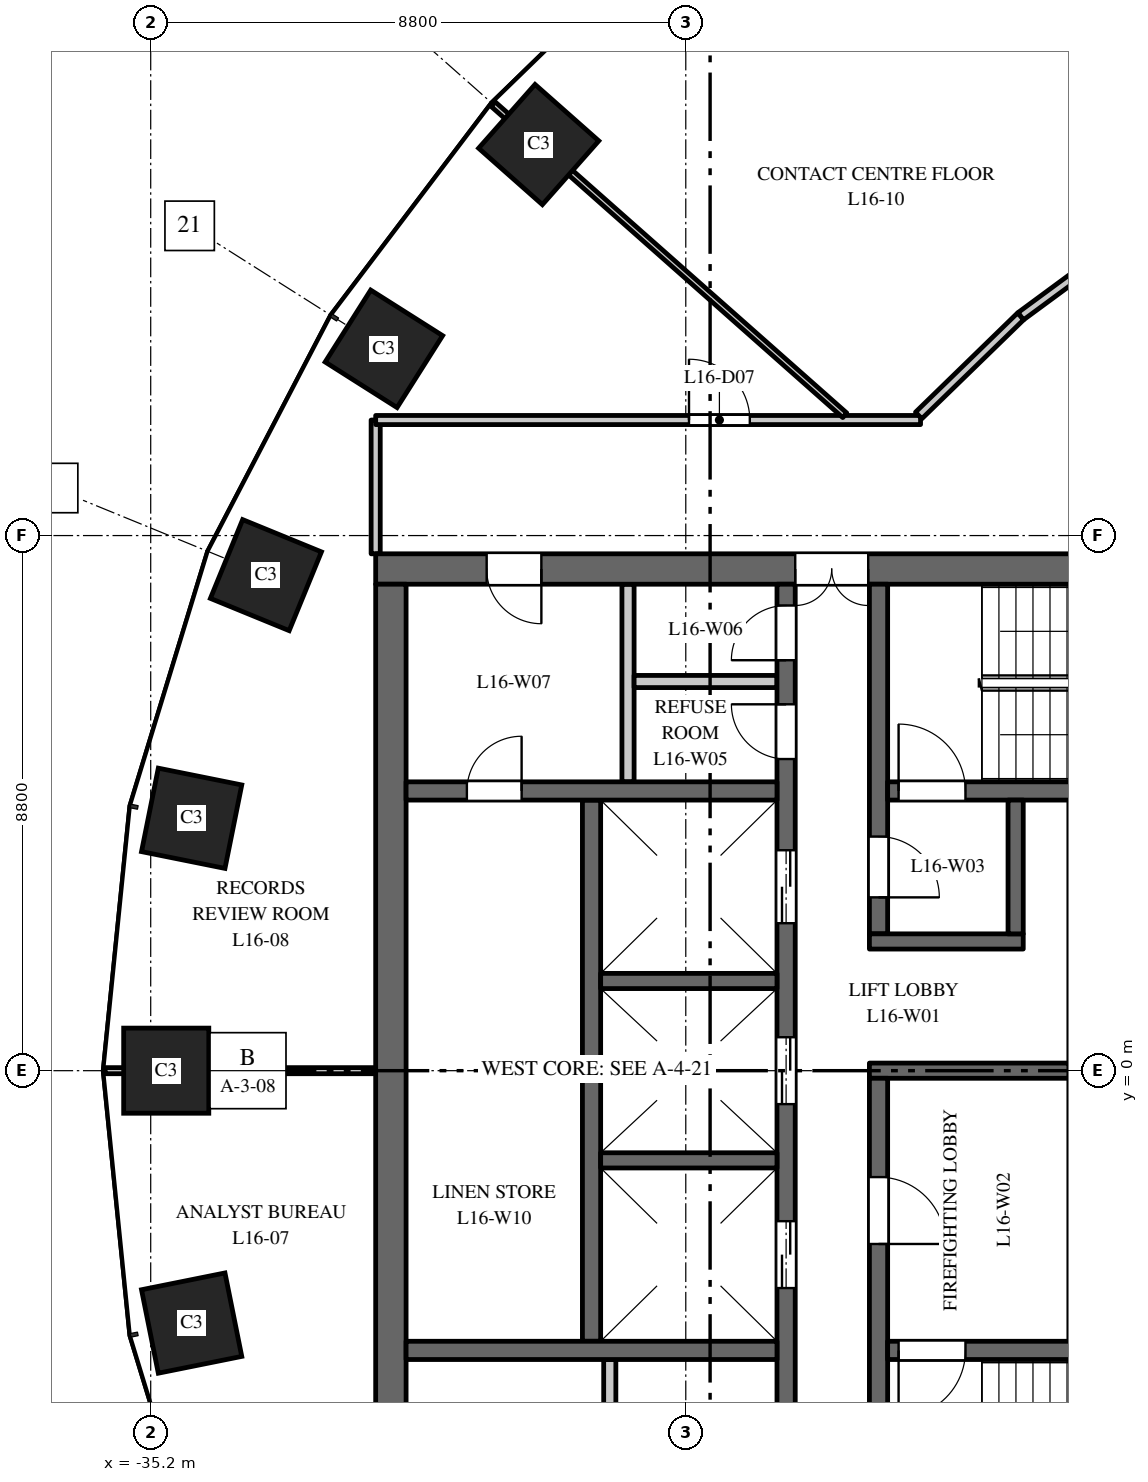
"""IFC4 building model, lengths in metres.
Left out: names, types, materials, properties, quantities, classifications, styles, units other than length and angle.
Written with IfcOpenShell. Run it as: python <this file> out.ifc"""

import sys

from ifc_helpers import new_model, si_unit, direction, frame, frame_2d, origin, origin_2d, place, context, subcontext, project, spatial, rectangle, extrude, element, fill, save


model = new_model("IFC4")
c1 = context("Model", 3, precision=1e-05, world=origin(), true_north=direction((0.0, 1.0)))
c2 = subcontext(c1, "Body", "Model", "MODEL_VIEW")
j1 = project(units=[si_unit("LENGTHUNIT", "METRE"), si_unit("PLANEANGLEUNIT", "RADIAN")], contexts=[c1])
p1 = place(None, origin())
s1 = spatial("IfcSite", under=j1, at=p1, CompositionType="ELEMENT")
p2 = place(p1, origin())
s2 = spatial("IfcBuilding", under=s1, at=p2, CompositionType="ELEMENT")
p3 = place(p2, frame((0.0, 0.0, 74.5)))
s3 = spatial("IfcBuildingStorey", under=s2, at=p3, CompositionType="ELEMENT", Elevation=74.5)
for number, where, z_axis, x_axis in (
    (1, (-28.819, 15.23, 0.0), (0.0, 0.0, 1.0), (-0.663, -0.749, 0.0)),
    (2, (-31.365, 11.871, 0.0), (0.0, 0.0, 1.0), (-0.535, -0.845, 0.0)),
    (3, (-33.305, 8.149, 0.0), (0.0, 0.0, 1.0), (-0.379, -0.925, 0.0)),
    (4, (-34.527, 4.151, 0.0), (0.0, 0.0, 1.0), (-0.197, -0.98, 0.0)),
    (5, (-34.945, 0.0, 0.0), (0.0, 0.0, 1.0), (0.0, -1.0, 0.0)),
    (6, (-34.527, -4.151, 0.0), (0.0, 0.0, 1.0), (0.197, -0.98, 0.0)),
):
    element("IfcColumn", number, at=place(p3, frame(where, z_axis=z_axis, x_axis=x_axis)), inside=s3, PredefinedType="COLUMN", context=c2, shape_type="SweptSolid", body=[
        extrude(rectangle(XDim=1.4, YDim=1.4, at=origin_2d()), origin(), (0.0, 0.0, 1.0), 4.0),
    ])
p4 = place(p3, frame((-16.5, 8.25, 0.0), z_axis=(0.0, 0.0, 1.0), x_axis=(-1.0, 0.0, 0.0)))
e7 = element("IfcWall", 7, at=p4, inside=s3, PredefinedType="SHEAR", context=c2, shape_type="SweptSolid", body=[
    extrude(rectangle(XDim=15.0, YDim=0.5, at=frame_2d((7.5, 0.0))), origin(), (0.0, 0.0, 1.0), 3.7),
])
p5 = place(p4, frame((6.9, 0.0, 0.0)))
e8 = element("IfcOpeningElement", 8, at=p5, cuts=e7, PredefinedType="OPENING", context=c2, shape_type="SweptSolid", body=[
    extrude(rectangle(XDim=1.2, YDim=2.1, at=frame_2d((0.6, 1.05))), frame((0.0, 0.26, 0.0), z_axis=(0.0, -1.0, 0.0), x_axis=(1.0, 0.0, 0.0)), (0.0, 0.0, 1.0), 0.52),
])
p6 = place(p4, frame((12.275, 0.0, 0.0)))
e9 = element("IfcOpeningElement", 9, at=p6, cuts=e7, PredefinedType="OPENING", context=c2, shape_type="SweptSolid", body=[
    extrude(rectangle(XDim=0.9, YDim=2.1, at=frame_2d((0.45, 1.05))), frame((0.0, 0.26, 0.0), z_axis=(0.0, -1.0, 0.0), x_axis=(1.0, 0.0, 0.0)), (0.0, 0.0, 1.0), 0.52),
])
p7 = place(p3, frame((-27.95, -4.45, 0.0), z_axis=(0.0, 0.0, 1.0), x_axis=(0.0, 1.0, 0.0)))
e10 = element("IfcWall", 10, at=p7, inside=s3, PredefinedType="SHEAR", context=c2, shape_type="SweptSolid", body=[
    extrude(rectangle(XDim=8.9, YDim=0.3, at=frame_2d((4.45, 0.0))), origin(), (0.0, 0.0, 1.0), 3.7),
])
p8 = place(p3, frame((-24.75, -8.0, 0.0), z_axis=(0.0, 0.0, 1.0), x_axis=(0.0, 1.0, 0.0)))
e11 = element("IfcWall", 11, at=p8, inside=s3, PredefinedType="SHEAR", context=c2, shape_type="SweptSolid", body=[
    extrude(rectangle(XDim=16.0, YDim=0.3, at=frame_2d((8.0, 0.0))), origin(), (0.0, 0.0, 1.0), 3.7),
])
p9 = place(p8, frame((4.425, 0.0, 0.0)))
e12 = element("IfcOpeningElement", 12, at=p9, cuts=e11, PredefinedType="OPENING", context=c2, shape_type="SweptSolid", body=[
    extrude(rectangle(XDim=1.1, YDim=2.1, at=frame_2d((0.55, 1.05))), frame((0.0, 0.16, 0.0), z_axis=(0.0, -1.0, 0.0), x_axis=(1.0, 0.0, 0.0)), (0.0, 0.0, 1.0), 0.32),
])
p10 = place(p8, frame((7.45, 0.0, 0.0)))
e13 = element("IfcOpeningElement", 13, at=p10, cuts=e11, PredefinedType="OPENING", context=c2, shape_type="SweptSolid", body=[
    extrude(rectangle(XDim=1.1, YDim=2.1, at=frame_2d((0.55, 1.05))), frame((0.0, 0.16, 0.0), z_axis=(0.0, -1.0, 0.0), x_axis=(1.0, 0.0, 0.0)), (0.0, 0.0, 1.0), 0.32),
])
p11 = place(p8, frame((10.425, 0.0, 0.0)))
e14 = element("IfcOpeningElement", 14, at=p11, cuts=e11, PredefinedType="OPENING", context=c2, shape_type="SweptSolid", body=[
    extrude(rectangle(XDim=1.2, YDim=2.1, at=frame_2d((0.6, 1.05))), frame((0.0, 0.16, 0.0), z_axis=(0.0, -1.0, 0.0), x_axis=(1.0, 0.0, 0.0)), (0.0, 0.0, 1.0), 0.32),
])
p12 = place(p8, frame((13.125, 0.0, 0.0)))
e15 = element("IfcOpeningElement", 15, at=p12, cuts=e11, PredefinedType="OPENING", context=c2, shape_type="SweptSolid", body=[
    extrude(rectangle(XDim=0.9, YDim=2.1, at=frame_2d((0.45, 1.05))), frame((0.0, 0.16, 0.0), z_axis=(0.0, -1.0, 0.0), x_axis=(1.0, 0.0, 0.0)), (0.0, 0.0, 1.0), 0.32),
])
p13 = place(p8, frame((14.75, 0.0, 0.0)))
e16 = element("IfcOpeningElement", 16, at=p13, cuts=e11, PredefinedType="OPENING", context=c2, shape_type="SweptSolid", body=[
    extrude(rectangle(XDim=0.9, YDim=2.1, at=frame_2d((0.45, 1.05))), frame((0.0, 0.16, 0.0), z_axis=(0.0, -1.0, 0.0), x_axis=(1.0, 0.0, 0.0)), (0.0, 0.0, 1.0), 0.32),
])
p14 = place(p8, frame((1.35, 0.0, 0.0)))
e17 = element("IfcOpeningElement", 17, at=p14, cuts=e11, PredefinedType="OPENING", context=c2, shape_type="SweptSolid", body=[
    extrude(rectangle(XDim=0.9, YDim=2.1, at=frame_2d((0.45, 1.05))), frame((0.0, 0.16, 0.0), z_axis=(0.0, -1.0, 0.0), x_axis=(1.0, 0.0, 0.0)), (0.0, 0.0, 1.0), 0.32),
])
p15 = place(p3, frame((-20.1, 0.0, 0.0), z_axis=(0.0, 0.0, 1.0), x_axis=(-1.0, 0.0, 0.0)))
e18 = element("IfcWall", 18, at=p15, inside=s3, PredefinedType="SHEAR", context=c2, shape_type="SweptSolid", body=[
    extrude(rectangle(XDim=3.28, YDim=0.25, at=frame_2d((1.64, 0.0))), origin(), (0.0, 0.0, 1.0), 3.7),
])
p16 = place(p3, frame((-31.25, -8.0, 0.0), z_axis=(0.0, 0.0, 1.0), x_axis=(0.0, 1.0, 0.0)))
e19 = element("IfcWall", 19, at=p16, inside=s3, PredefinedType="SHEAR", context=c2, shape_type="SweptSolid", body=[
    extrude(rectangle(XDim=16.0, YDim=0.5, at=frame_2d((8.0, 0.0))), origin(), (0.0, 0.0, 1.0), 3.7),
])
p17 = place(p3, frame((-24.9, 4.6, 0.0), z_axis=(0.0, 0.0, 1.0), x_axis=(-1.0, 0.0, 0.0)))
e20 = element("IfcWall", 20, at=p17, inside=s3, PredefinedType="SHEAR", context=c2, shape_type="SweptSolid", body=[
    extrude(rectangle(XDim=6.1, YDim=0.3, at=frame_2d((3.05, 0.0))), origin(), (0.0, 0.0, 1.0), 3.7),
])
p18 = place(p17, frame((4.2, 0.0, 0.0)))
e21 = element("IfcOpeningElement", 21, at=p18, cuts=e20, PredefinedType="OPENING", context=c2, shape_type="SweptSolid", body=[
    extrude(rectangle(XDim=0.9, YDim=2.1, at=frame_2d((0.45, 1.05))), frame((0.0, 0.16, 0.0), z_axis=(0.0, -1.0, 0.0), x_axis=(1.0, 0.0, 0.0)), (0.0, 0.0, 1.0), 0.32),
])
for number, where, z_axis, x_axis in (
    (22, (-27.35, 4.75, 0.0), (0.0, 0.0, 1.0), (0.0, 1.0, 0.0)),
    (23, (-27.65, -8.0, 0.0), (0.0, 0.0, 1.0), (0.0, 1.0, 0.0)),
):
    element("IfcWall", number, at=place(p3, frame(where, z_axis=z_axis, x_axis=x_axis)), inside=s3, PredefinedType="PARTITIONING", context=c2, shape_type="SweptSolid", body=[
        extrude(rectangle(XDim=3.25, YDim=0.2, at=frame_2d((1.625, 0.0))), origin(), (0.0, 0.0, 1.0), 3.7),
    ])
p19 = place(p3, frame((-24.9, 6.4, 0.0), z_axis=(0.0, 0.0, 1.0), x_axis=(-1.0, 0.0, 0.0)))
e24 = element("IfcWall", 24, at=p19, inside=s3, PredefinedType="PARTITIONING", context=c2, shape_type="SweptSolid", body=[
    extrude(rectangle(XDim=2.35, YDim=0.2, at=frame_2d((1.175, 0.0))), origin(), (0.0, 0.0, 1.0), 3.7),
])
p20 = place(p3, frame((-24.9, -4.6, 0.0), z_axis=(0.0, 0.0, 1.0), x_axis=(-1.0, 0.0, 0.0)))
e25 = element("IfcWall", 25, at=p20, inside=s3, PredefinedType="SHEAR", context=c2, shape_type="SweptSolid", body=[
    extrude(rectangle(XDim=6.1, YDim=0.3, at=frame_2d((3.05, 0.0))), origin(), (0.0, 0.0, 1.0), 3.7),
])
for number, where, z_axis, x_axis in (
    (26, (-24.9, -1.475, 0.0), (0.0, 0.0, 1.0), (-1.0, 0.0, 0.0)),
    (27, (-24.9, 1.475, 0.0), (0.0, 0.0, 1.0), (-1.0, 0.0, 0.0)),
):
    element("IfcWall", number, at=place(p3, frame(where, z_axis=z_axis, x_axis=x_axis)), inside=s3, PredefinedType="SHEAR", context=c2, shape_type="SweptSolid", body=[
        extrude(rectangle(XDim=2.9, YDim=0.25, at=frame_2d((1.45, 0.0))), origin(), (0.0, 0.0, 1.0), 3.7),
    ])
p21 = place(p3, frame((-23.23, 2.25, 0.0), z_axis=(0.0, 0.0, 1.0), x_axis=(0.0, 1.0, 0.0)))
e28 = element("IfcWall", 28, at=p21, inside=s3, PredefinedType="SHEAR", context=c2, shape_type="SweptSolid", body=[
    extrude(rectangle(XDim=5.75, YDim=0.3, at=frame_2d((2.875, 0.0))), origin(), (0.0, 0.0, 1.0), 3.7),
])
p22 = place(p21, frame((0.6, 0.0, 0.0)))
e29 = element("IfcOpeningElement", 29, at=p22, cuts=e28, PredefinedType="OPENING", context=c2, shape_type="SweptSolid", body=[
    extrude(rectangle(XDim=1.0, YDim=2.1, at=frame_2d((0.5, 1.05))), frame((0.0, 0.16, 0.0), z_axis=(0.0, -1.0, 0.0), x_axis=(1.0, 0.0, 0.0)), (0.0, 0.0, 1.0), 0.32),
])
p23 = place(p3, frame((-23.23, -8.0, 0.0), z_axis=(0.0, 0.0, 1.0), x_axis=(0.0, 1.0, 0.0)))
e30 = element("IfcWall", 30, at=p23, inside=s3, PredefinedType="SHEAR", context=c2, shape_type="SweptSolid", body=[
    extrude(rectangle(XDim=7.875, YDim=0.3, at=frame_2d((3.938, 0.0))), origin(), (0.0, 0.0, 1.0), 3.7),
])
p24 = place(p23, frame((5.15, 0.0, 0.0)))
e31 = element("IfcOpeningElement", 31, at=p24, cuts=e30, PredefinedType="OPENING", context=c2, shape_type="SweptSolid", body=[
    extrude(rectangle(XDim=1.1, YDim=2.1, at=frame_2d((0.55, 1.05))), frame((0.0, 0.16, 0.0), z_axis=(0.0, -1.0, 0.0), x_axis=(1.0, 0.0, 0.0)), (0.0, 0.0, 1.0), 0.32),
])
p25 = place(p3, frame((-16.9, 4.6, 0.0), z_axis=(0.0, 0.0, 1.0), x_axis=(-1.0, 0.0, 0.0)))
e32 = element("IfcWall", 32, at=p25, inside=s3, PredefinedType="SHEAR", context=c2, shape_type="SweptSolid", body=[
    extrude(rectangle(XDim=6.18, YDim=0.3, at=frame_2d((3.09, 0.0))), origin(), (0.0, 0.0, 1.0), 3.7),
])
p26 = place(p25, frame((4.9, 0.0, 0.0)))
e33 = element("IfcOpeningElement", 33, at=p26, cuts=e32, PredefinedType="OPENING", context=c2, shape_type="SweptSolid", body=[
    extrude(rectangle(XDim=1.1, YDim=2.1, at=frame_2d((0.55, 1.05))), frame((0.0, 0.16, 0.0), z_axis=(0.0, -1.0, 0.0), x_axis=(1.0, 0.0, 0.0)), (0.0, 0.0, 1.0), 0.32),
])
p27 = place(p3, frame((-16.9, -4.6, 0.0), z_axis=(0.0, 0.0, 1.0), x_axis=(-1.0, 0.0, 0.0)))
e34 = element("IfcWall", 34, at=p27, inside=s3, PredefinedType="SHEAR", context=c2, shape_type="SweptSolid", body=[
    extrude(rectangle(XDim=6.18, YDim=0.3, at=frame_2d((3.09, 0.0))), origin(), (0.0, 0.0, 1.0), 3.7),
])
p28 = place(p27, frame((4.9, 0.0, 0.0)))
e35 = element("IfcOpeningElement", 35, at=p28, cuts=e34, PredefinedType="OPENING", context=c2, shape_type="SweptSolid", body=[
    extrude(rectangle(XDim=1.1, YDim=2.1, at=frame_2d((0.55, 1.05))), frame((0.0, 0.16, 0.0), z_axis=(0.0, -1.0, 0.0), x_axis=(1.0, 0.0, 0.0)), (0.0, 0.0, 1.0), 0.32),
])
p29 = place(p3, frame((-20.85, 2.125, 0.0), z_axis=(0.0, 0.0, 1.0), x_axis=(-1.0, 0.0, 0.0)))
e36 = element("IfcWall", 36, at=p29, inside=s3, PredefinedType="SHEAR", context=c2, shape_type="SweptSolid", body=[
    extrude(rectangle(XDim=2.53, YDim=0.25, at=frame_2d((1.265, 0.0))), origin(), (0.0, 0.0, 1.0), 3.7),
])
p30 = place(p3, frame((-20.975, 2.25, 0.0), z_axis=(0.0, 0.0, 1.0), x_axis=(0.0, 1.0, 0.0)))
e37 = element("IfcWall", 37, at=p30, inside=s3, PredefinedType="SHEAR", context=c2, shape_type="SweptSolid", body=[
    extrude(rectangle(XDim=2.2, YDim=0.25, at=frame_2d((1.1, 0.0))), origin(), (0.0, 0.0, 1.0), 3.7),
])
p31 = place(p3, frame((-35.949, 0.0, 0.0), z_axis=(0.0, 0.0, 1.0), x_axis=(1.0, 0.0, 0.0)))
e38 = element("IfcWall", 38, at=p31, inside=s3, PredefinedType="PARTITIONING", context=c2, shape_type="SweptSolid", body=[
    extrude(rectangle(XDim=4.449, YDim=0.1, at=frame_2d((2.225, 0.0))), origin(), (0.0, 0.0, 1.0), 2.85),
])
p32 = place(p3, frame((-31.5, 8.5, 0.0), z_axis=(0.0, 0.0, 1.0), x_axis=(0.0, 1.0, 0.0)))
e39 = element("IfcWall", 39, at=p32, inside=s3, PredefinedType="PARTITIONING", context=c2, shape_type="SweptSolid", body=[
    extrude(rectangle(XDim=2.2, YDim=0.15, at=frame_2d((1.1, 0.0))), origin(), (0.0, 0.0, 1.0), 3.7),
])
p33 = place(p3, frame((-31.5, 10.7, 0.0), z_axis=(0.0, 0.0, 1.0), x_axis=(1.0, 0.0, 0.0)))
e40 = element("IfcWall", 40, at=p33, inside=s3, PredefinedType="PARTITIONING", context=c2, shape_type="SweptSolid", body=[
    extrude(rectangle(XDim=8.961, YDim=0.15, at=frame_2d((4.48, 0.0))), origin(), (0.0, 0.0, 1.0), 3.1),
])
p34 = place(p33, frame((5.153, 0.0, 0.0)))
e41 = element("IfcOpeningElement", 41, at=p34, cuts=e40, PredefinedType="OPENING", context=c2, shape_type="SweptSolid", body=[
    extrude(rectangle(XDim=1.0, YDim=2.1, at=frame_2d((0.5, 1.05))), frame((0.0, 0.085, 0.0), z_axis=(0.0, -1.0, 0.0), x_axis=(1.0, 0.0, 0.0)), (0.0, 0.0, 1.0), 0.17),
])
p35 = place(p3, frame((-29.569, 15.895, 0.0), z_axis=(0.0, 0.0, 1.0), x_axis=(0.748985701008, -0.662586160198, 0.0)))
e42 = element("IfcWall", 42, at=p35, inside=s3, PredefinedType="PARTITIONING", context=c2, shape_type="SweptSolid", body=[
    extrude(rectangle(XDim=7.723, YDim=0.1, at=frame_2d((3.861, 0.0))), origin(), (0.0, 0.0, 1.0), 2.85),
])
p36 = place(p3, frame((-22.57, 10.775, 0.0), z_axis=(0.0, 0.0, 1.0), x_axis=(0.717045582263, 0.697026278527, 0.0)))
e43 = element("IfcWall", 43, at=p36, inside=s3, PredefinedType="PARTITIONING", context=c2, shape_type="SweptSolid", body=[
    extrude(rectangle(XDim=2.342, YDim=0.15, at=frame_2d((1.171, 0.0))), origin(), (0.0, 0.0, 1.0), 3.7),
])
p37 = place(p3, frame((-20.891, 12.407, 0.0), z_axis=(0.0, 0.0, 1.0), x_axis=(0.805303685339, 0.592862525701, 0.0)))
e44 = element("IfcWall", 44, at=p37, inside=s3, PredefinedType="PARTITIONING", context=c2, shape_type="SweptSolid", body=[
    extrude(rectangle(XDim=3.267, YDim=0.15, at=frame_2d((1.634, 0.0))), origin(), (0.0, 0.0, 1.0), 2.75),
])
p38 = place(p9, origin())
e45 = element("IfcDoor", 45, at=p38, inside=s3, OperationType="DOUBLE_DOOR_SLIDING", PredefinedType="DOOR", context=c2, shape_type="SweptSolid", body=[
    extrude(rectangle(XDim=1.1, YDim=2.1, at=frame_2d((0.55, 1.05))), frame((0.0, 0.025, 0.0), z_axis=(0.0, -1.0, 0.0), x_axis=(1.0, 0.0, 0.0)), (0.0, 0.0, 1.0), 0.05),
])
fill(e12, e45)
p39 = place(p10, origin())
e46 = element("IfcDoor", 46, at=p39, inside=s3, OperationType="DOUBLE_DOOR_SLIDING", PredefinedType="DOOR", context=c2, shape_type="SweptSolid", body=[
    extrude(rectangle(XDim=1.1, YDim=2.1, at=frame_2d((0.55, 1.05))), frame((0.0, 0.025, 0.0), z_axis=(0.0, -1.0, 0.0), x_axis=(1.0, 0.0, 0.0)), (0.0, 0.0, 1.0), 0.05),
])
fill(e13, e46)
p40 = place(p11, origin())
e47 = element("IfcDoor", 47, at=p40, inside=s3, OperationType="DOUBLE_DOOR_SLIDING", PredefinedType="DOOR", context=c2, shape_type="SweptSolid", body=[
    extrude(rectangle(XDim=1.2, YDim=2.1, at=frame_2d((0.6, 1.05))), frame((0.0, 0.025, 0.0), z_axis=(0.0, -1.0, 0.0), x_axis=(1.0, 0.0, 0.0)), (0.0, 0.0, 1.0), 0.05),
])
fill(e14, e47)
p41 = place(p26, origin())
e48 = element("IfcDoor", 48, at=p41, inside=s3, OperationType="SINGLE_SWING_RIGHT", PredefinedType="DOOR", context=c2, shape_type="SweptSolid", body=[
    extrude(rectangle(XDim=1.1, YDim=2.1, at=frame_2d((0.55, 1.05))), frame((0.0, 0.025, 0.0), z_axis=(0.0, -1.0, 0.0), x_axis=(1.0, 0.0, 0.0)), (0.0, 0.0, 1.0), 0.05),
])
fill(e33, e48)
p42 = place(p28, origin())
e49 = element("IfcDoor", 49, at=p42, inside=s3, OperationType="SINGLE_SWING_LEFT", PredefinedType="DOOR", context=c2, shape_type="SweptSolid", body=[
    extrude(rectangle(XDim=1.1, YDim=2.1, at=frame_2d((0.55, 1.05))), frame((0.0, 0.025, 0.0), z_axis=(0.0, -1.0, 0.0), x_axis=(1.0, 0.0, 0.0)), (0.0, 0.0, 1.0), 0.05),
])
fill(e35, e49)
p43 = place(p24, origin())
e50 = element("IfcDoor", 50, at=p43, inside=s3, OperationType="SINGLE_SWING_LEFT", PredefinedType="DOOR", context=c2, shape_type="SweptSolid", body=[
    extrude(rectangle(XDim=1.1, YDim=2.1, at=frame_2d((0.55, 1.05))), frame((0.0, 0.025, 0.0), z_axis=(0.0, -1.0, 0.0), x_axis=(1.0, 0.0, 0.0)), (0.0, 0.0, 1.0), 0.05),
])
fill(e31, e50)
p44 = place(p22, origin())
e51 = element("IfcDoor", 51, at=p44, inside=s3, OperationType="SINGLE_SWING_LEFT", PredefinedType="DOOR", context=c2, shape_type="SweptSolid", body=[
    extrude(rectangle(XDim=1.0, YDim=2.1, at=frame_2d((0.5, 1.05))), frame((0.0, 0.025, 0.0), z_axis=(0.0, -1.0, 0.0), x_axis=(1.0, 0.0, 0.0)), (0.0, 0.0, 1.0), 0.05),
])
fill(e29, e51)
p45 = place(p5, origin())
e52 = element("IfcDoor", 52, at=p45, inside=s3, OperationType="DOUBLE_DOOR_DOUBLE_SWING", PredefinedType="DOOR", context=c2, shape_type="SweptSolid", body=[
    extrude(rectangle(XDim=1.2, YDim=2.1, at=frame_2d((0.6, 1.05))), frame((0.0, 0.025, 0.0), z_axis=(0.0, -1.0, 0.0), x_axis=(1.0, 0.0, 0.0)), (0.0, 0.0, 1.0), 0.05),
])
fill(e8, e52)
p46 = place(p12, origin())
e53 = element("IfcDoor", 53, at=p46, inside=s3, OperationType="SINGLE_SWING_LEFT", PredefinedType="DOOR", context=c2, shape_type="SweptSolid", body=[
    extrude(rectangle(XDim=0.9, YDim=2.1, at=frame_2d((0.45, 1.05))), frame((0.0, 0.025, 0.0), z_axis=(0.0, -1.0, 0.0), x_axis=(1.0, 0.0, 0.0)), (0.0, 0.0, 1.0), 0.05),
])
fill(e15, e53)
p47 = place(p13, origin())
e54 = element("IfcDoor", 54, at=p47, inside=s3, OperationType="SINGLE_SWING_RIGHT", PredefinedType="DOOR", context=c2, shape_type="SweptSolid", body=[
    extrude(rectangle(XDim=0.9, YDim=2.1, at=frame_2d((0.45, 1.05))), frame((0.0, 0.025, 0.0), z_axis=(0.0, -1.0, 0.0), x_axis=(1.0, 0.0, 0.0)), (0.0, 0.0, 1.0), 0.05),
])
fill(e16, e54)
p48 = place(p6, origin())
e55 = element("IfcDoor", 55, at=p48, inside=s3, OperationType="SINGLE_SWING_RIGHT", PredefinedType="DOOR", context=c2, shape_type="SweptSolid", body=[
    extrude(rectangle(XDim=0.9, YDim=2.1, at=frame_2d((0.45, 1.05))), frame((0.0, 0.025, 0.0), z_axis=(0.0, -1.0, 0.0), x_axis=(1.0, 0.0, 0.0)), (0.0, 0.0, 1.0), 0.05),
])
fill(e9, e55)
p49 = place(p18, origin())
e56 = element("IfcDoor", 56, at=p49, inside=s3, OperationType="SINGLE_SWING_LEFT", PredefinedType="DOOR", context=c2, shape_type="SweptSolid", body=[
    extrude(rectangle(XDim=0.9, YDim=2.1, at=frame_2d((0.45, 1.05))), frame((0.0, 0.025, 0.0), z_axis=(0.0, -1.0, 0.0), x_axis=(1.0, 0.0, 0.0)), (0.0, 0.0, 1.0), 0.05),
])
fill(e21, e56)
p50 = place(p34, origin())
e57 = element("IfcDoor", 57, at=p50, inside=s3, OperationType="SINGLE_SWING_LEFT", PredefinedType="DOOR", context=c2, shape_type="SweptSolid", body=[
    extrude(rectangle(XDim=1.0, YDim=2.1, at=frame_2d((0.5, 1.05))), frame((0.0, 0.025, 0.0), z_axis=(0.0, -1.0, 0.0), x_axis=(1.0, 0.0, 0.0)), (0.0, 0.0, 1.0), 0.05),
])
fill(e41, e57)
save(model, sys.argv[1])
